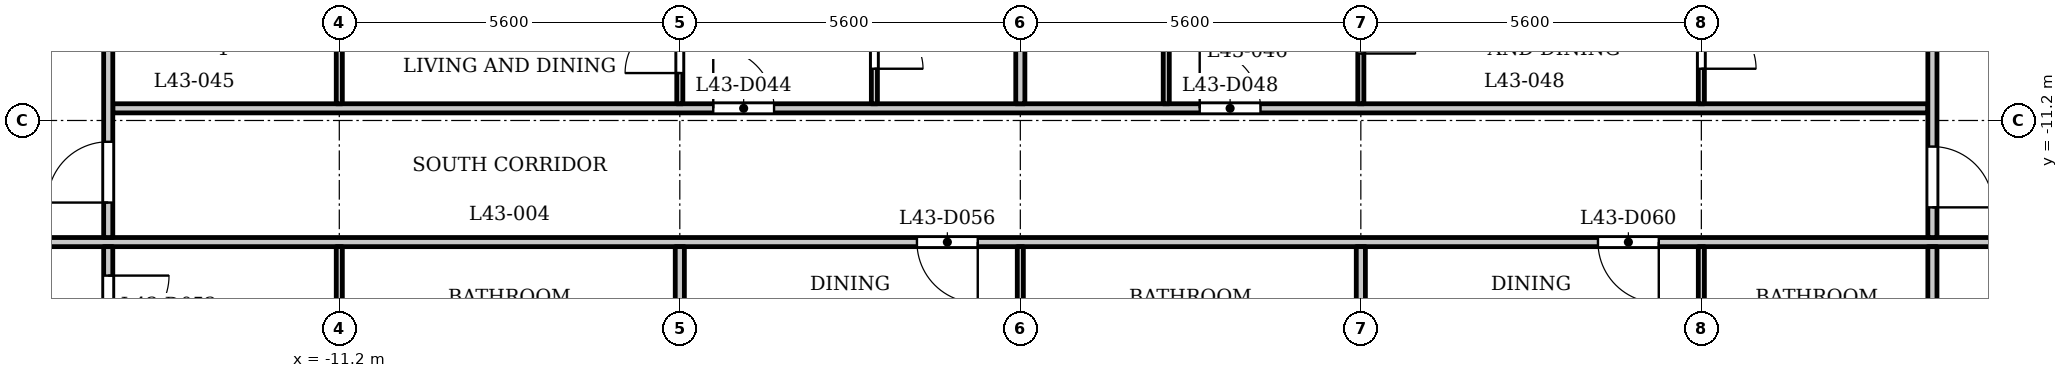
"""IFC4 building model, lengths in metres.
Left out: names, types, materials, properties, quantities, classifications, styles, units other than length and angle.
Written with IfcOpenShell. Run it as: python <this file> out.ifc"""

import sys

from ifc_helpers import new_model, si_unit, direction, frame, frame_2d, origin, place, context, subcontext, project, spatial, rectangle, extrude, element, fill, save


model = new_model("IFC4")
c1 = context("Model", 3, precision=1e-05, world=origin(), true_north=direction((0.0, 1.0)))
c2 = subcontext(c1, "Body", "Model", "MODEL_VIEW")
j1 = project(units=[si_unit("LENGTHUNIT", "METRE"), si_unit("PLANEANGLEUNIT", "RADIAN")], contexts=[c1])
p1 = place(None, origin())
s1 = spatial("IfcSite", under=j1, at=p1, CompositionType="ELEMENT")
p2 = place(p1, origin())
s2 = spatial("IfcBuilding", under=s1, at=p2, CompositionType="ELEMENT")
p3 = place(p2, frame((0.0, 0.0, 167.6)))
s3 = spatial("IfcBuildingStorey", under=s2, at=p3, CompositionType="ELEMENT", Elevation=167.6)
p4 = place(p3, frame((-17.4, -13.2, 0.0), z_axis=(0.0, 0.0, 1.0), x_axis=(1.0, 0.0, 0.0)))
e1 = element("IfcWall", 1, at=p4, inside=s3, PredefinedType="PARTITIONING", context=c2, shape_type="SweptSolid", body=[
    extrude(rectangle(XDim=34.8, YDim=0.15, at=frame_2d((17.4, 0.0))), origin(), (0.0, 0.0, 1.0), 3.2),
])
p5 = place(p4, frame((0.15, 0.0, 0.0)))
e2 = element("IfcOpeningElement", 2, at=p5, cuts=e1, PredefinedType="OPENING", context=c2, shape_type="SweptSolid", body=[
    extrude(rectangle(XDim=1.0, YDim=2.1, at=frame_2d((0.5, 1.05))), frame((0.0, 0.085, 0.0), z_axis=(0.0, -1.0, 0.0), x_axis=(1.0, 0.0, 0.0)), (0.0, 0.0, 1.0), 0.17),
])
p6 = place(p4, frame((33.55, 0.0, 0.0)))
e3 = element("IfcOpeningElement", 3, at=p6, cuts=e1, PredefinedType="OPENING", context=c2, shape_type="SweptSolid", body=[
    extrude(rectangle(XDim=1.0, YDim=2.1, at=frame_2d((0.5, 1.05))), frame((0.0, 0.085, 0.0), z_axis=(0.0, -1.0, 0.0), x_axis=(1.0, 0.0, 0.0)), (0.0, 0.0, 1.0), 0.17),
])
p7 = place(p4, frame((15.7, 0.0, 0.0)))
e4 = element("IfcOpeningElement", 4, at=p7, cuts=e1, PredefinedType="OPENING", context=c2, shape_type="SweptSolid", body=[
    extrude(rectangle(XDim=1.0, YDim=2.1, at=frame_2d((0.5, 1.05))), frame((0.0, 0.085, 0.0), z_axis=(0.0, -1.0, 0.0), x_axis=(1.0, 0.0, 0.0)), (0.0, 0.0, 1.0), 0.17),
])
p8 = place(p4, frame((26.9, 0.0, 0.0)))
e5 = element("IfcOpeningElement", 5, at=p8, cuts=e1, PredefinedType="OPENING", context=c2, shape_type="SweptSolid", body=[
    extrude(rectangle(XDim=1.0, YDim=2.1, at=frame_2d((0.5, 1.05))), frame((0.0, 0.085, 0.0), z_axis=(0.0, -1.0, 0.0), x_axis=(1.0, 0.0, 0.0)), (0.0, 0.0, 1.0), 0.17),
])
p9 = place(p3, frame((-14.925, -11.0, 0.0), z_axis=(0.0, 0.0, 1.0), x_axis=(1.0, 0.0, 0.0)))
e6 = element("IfcWall", 6, at=p9, inside=s3, PredefinedType="PARTITIONING", context=c2, shape_type="SweptSolid", body=[
    extrude(rectangle(XDim=29.85, YDim=0.15, at=frame_2d((14.925, 0.0))), origin(), (0.0, 0.0, 1.0), 3.2),
])
p10 = place(p9, frame((9.875, 0.0, 0.0)))
e7 = element("IfcOpeningElement", 7, at=p10, cuts=e6, PredefinedType="OPENING", context=c2, shape_type="SweptSolid", body=[
    extrude(rectangle(XDim=1.0, YDim=2.1, at=frame_2d((0.5, 1.05))), frame((0.0, 0.085, 0.0), z_axis=(0.0, -1.0, 0.0), x_axis=(1.0, 0.0, 0.0)), (0.0, 0.0, 1.0), 0.17),
])
p11 = place(p9, frame((17.875, 0.0, 0.0)))
e8 = element("IfcOpeningElement", 8, at=p11, cuts=e6, PredefinedType="OPENING", context=c2, shape_type="SweptSolid", body=[
    extrude(rectangle(XDim=1.0, YDim=2.1, at=frame_2d((0.5, 1.05))), frame((0.0, 0.085, 0.0), z_axis=(0.0, -1.0, 0.0), x_axis=(1.0, 0.0, 0.0)), (0.0, 0.0, 1.0), 0.17),
])
p12 = place(p3, frame((-15.0, -15.325, 0.0), z_axis=(0.0, 0.0, 1.0), x_axis=(0.0, 1.0, 0.0)))
e9 = element("IfcWall", 9, at=p12, inside=s3, PredefinedType="PARTITIONING", context=c2, shape_type="SweptSolid", body=[
    extrude(rectangle(XDim=2.05, YDim=0.15, at=frame_2d((1.025, 0.0))), origin(), (0.0, 0.0, 1.0), 3.2),
])
p13 = place(p12, frame((0.574, 0.0, 0.0)))
e10 = element("IfcOpeningElement", 10, at=p13, cuts=e9, PredefinedType="OPENING", context=c2, shape_type="SweptSolid", body=[
    extrude(rectangle(XDim=1.0, YDim=2.1, at=frame_2d((0.5, 1.05))), frame((0.0, 0.085, 0.0), z_axis=(0.0, -1.0, 0.0), x_axis=(1.0, 0.0, 0.0)), (0.0, 0.0, 1.0), 0.17),
])
p14 = place(p3, frame((-15.0, -13.125, 0.0), z_axis=(0.0, 0.0, 1.0), x_axis=(0.0, 1.0, 0.0)))
e11 = element("IfcWall", 11, at=p14, inside=s3, PredefinedType="PARTITIONING", context=c2, shape_type="SweptSolid", body=[
    extrude(rectangle(XDim=6.356, YDim=0.15, at=frame_2d((3.178, 0.0))), origin(), (0.0, 0.0, 1.0), 3.2),
])
p15 = place(p14, frame((0.575, 0.0, 0.0)))
e12 = element("IfcOpeningElement", 12, at=p15, cuts=e11, PredefinedType="OPENING", context=c2, shape_type="SweptSolid", body=[
    extrude(rectangle(XDim=1.0, YDim=2.1, at=frame_2d((0.5, 1.05))), frame((0.0, 0.085, 0.0), z_axis=(0.0, -1.0, 0.0), x_axis=(1.0, 0.0, 0.0)), (0.0, 0.0, 1.0), 0.17),
])
p16 = place(p3, frame((-11.2, -15.85, 0.0), z_axis=(0.0, 0.0, 1.0), x_axis=(0.0, 1.0, 0.0)))
e13 = element("IfcWall", 13, at=p16, inside=s3, PredefinedType="PARTITIONING", context=c2, shape_type="SweptSolid", body=[
    extrude(rectangle(XDim=2.575, YDim=0.1, at=frame_2d((1.288, 0.0))), origin(), (0.0, 0.0, 1.0), 3.2),
])
p17 = place(p3, frame((-11.2, -10.925, 0.0), z_axis=(0.0, 0.0, 1.0), x_axis=(0.0, 1.0, 0.0)))
e14 = element("IfcWall", 14, at=p17, inside=s3, PredefinedType="PARTITIONING", context=c2, shape_type="SweptSolid", body=[
    extrude(rectangle(XDim=3.605, YDim=0.1, at=frame_2d((1.802, 0.0))), origin(), (0.0, 0.0, 1.0), 3.2),
])
p18 = place(p17, frame((1.005, 0.0, 0.0)))
e15 = element("IfcOpeningElement", 15, at=p18, cuts=e14, PredefinedType="OPENING", context=c2, shape_type="SweptSolid", body=[
    extrude(rectangle(XDim=0.9, YDim=2.1, at=frame_2d((0.45, 1.05))), frame((0.0, 0.06, 0.0), z_axis=(0.0, -1.0, 0.0), x_axis=(1.0, 0.0, 0.0)), (0.0, 0.0, 1.0), 0.12),
])
p19 = place(p3, frame((-5.6, -10.925, 0.0), z_axis=(0.0, 0.0, 1.0), x_axis=(0.0, 1.0, 0.0)))
e16 = element("IfcWall", 16, at=p19, inside=s3, PredefinedType="PARTITIONING", context=c2, shape_type="SweptSolid", body=[
    extrude(rectangle(XDim=3.605, YDim=0.1, at=frame_2d((1.802, 0.0))), origin(), (0.0, 0.0, 1.0), 3.2),
])
p20 = place(p19, frame((0.505, 0.0, 0.0)))
e17 = element("IfcOpeningElement", 17, at=p20, cuts=e16, PredefinedType="OPENING", context=c2, shape_type="SweptSolid", body=[
    extrude(rectangle(XDim=0.9, YDim=2.1, at=frame_2d((0.45, 1.05))), frame((0.0, 0.06, 0.0), z_axis=(0.0, -1.0, 0.0), x_axis=(1.0, 0.0, 0.0)), (0.0, 0.0, 1.0), 0.12),
])
p21 = place(p3, frame((-5.6, -15.85, 0.0), z_axis=(0.0, 0.0, 1.0), x_axis=(0.0, 1.0, 0.0)))
e18 = element("IfcWall", 18, at=p21, inside=s3, PredefinedType="PARTITIONING", context=c2, shape_type="SweptSolid", body=[
    extrude(rectangle(XDim=2.575, YDim=0.15, at=frame_2d((1.288, 0.0))), origin(), (0.0, 0.0, 1.0), 3.2),
])
p22 = place(p3, frame((-2.4, -10.925, 0.0), z_axis=(0.0, 0.0, 1.0), x_axis=(0.0, 1.0, 0.0)))
e19 = element("IfcWall", 19, at=p22, inside=s3, PredefinedType="PARTITIONING", context=c2, shape_type="SweptSolid", body=[
    extrude(rectangle(XDim=3.605, YDim=0.1, at=frame_2d((1.802, 0.0))), origin(), (0.0, 0.0, 1.0), 3.2),
])
p23 = place(p22, frame((0.576, 0.0, 0.0)))
e20 = element("IfcOpeningElement", 20, at=p23, cuts=e19, PredefinedType="OPENING", context=c2, shape_type="SweptSolid", body=[
    extrude(rectangle(XDim=0.8, YDim=2.1, at=frame_2d((0.4, 1.05))), frame((0.0, 0.06, 0.0), z_axis=(0.0, -1.0, 0.0), x_axis=(1.0, 0.0, 0.0)), (0.0, 0.0, 1.0), 0.12),
])
p24 = place(p3, frame((0.0, -15.85, 0.0), z_axis=(0.0, 0.0, 1.0), x_axis=(0.0, 1.0, 0.0)))
e21 = element("IfcWall", 21, at=p24, inside=s3, PredefinedType="PARTITIONING", context=c2, shape_type="SweptSolid", body=[
    extrude(rectangle(XDim=2.575, YDim=0.1, at=frame_2d((1.288, 0.0))), origin(), (0.0, 0.0, 1.0), 3.2),
])
p25 = place(p3, frame((0.0, -10.925, 0.0), z_axis=(0.0, 0.0, 1.0), x_axis=(0.0, 1.0, 0.0)))
e22 = element("IfcWall", 22, at=p25, inside=s3, PredefinedType="PARTITIONING", context=c2, shape_type="SweptSolid", body=[
    extrude(rectangle(XDim=3.605, YDim=0.15, at=frame_2d((1.802, 0.0))), origin(), (0.0, 0.0, 1.0), 3.2),
])
p26 = place(p3, frame((2.4, -10.925, 0.0), z_axis=(0.0, 0.0, 1.0), x_axis=(0.0, 1.0, 0.0)))
e23 = element("IfcWall", 23, at=p26, inside=s3, PredefinedType="PARTITIONING", context=c2, shape_type="SweptSolid", body=[
    extrude(rectangle(XDim=3.605, YDim=0.1, at=frame_2d((1.802, 0.0))), origin(), (0.0, 0.0, 1.0), 3.2),
])
p27 = place(p26, frame((2.355, 0.0, 0.0)))
e24 = element("IfcOpeningElement", 24, at=p27, cuts=e23, PredefinedType="OPENING", context=c2, shape_type="SweptSolid", body=[
    extrude(rectangle(XDim=0.8, YDim=2.1, at=frame_2d((0.4, 1.05))), frame((0.0, 0.06, 0.0), z_axis=(0.0, -1.0, 0.0), x_axis=(1.0, 0.0, 0.0)), (0.0, 0.0, 1.0), 0.12),
])
p28 = place(p3, frame((5.6, -10.925, 0.0), z_axis=(0.0, 0.0, 1.0), x_axis=(0.0, 1.0, 0.0)))
e25 = element("IfcWall", 25, at=p28, inside=s3, PredefinedType="PARTITIONING", context=c2, shape_type="SweptSolid", body=[
    extrude(rectangle(XDim=3.605, YDim=0.1, at=frame_2d((1.802, 0.0))), origin(), (0.0, 0.0, 1.0), 3.2),
])
p29 = place(p28, frame((0.826, 0.0, 0.0)))
e26 = element("IfcOpeningElement", 26, at=p29, cuts=e25, PredefinedType="OPENING", context=c2, shape_type="SweptSolid", body=[
    extrude(rectangle(XDim=0.9, YDim=2.1, at=frame_2d((0.45, 1.05))), frame((0.0, 0.06, 0.0), z_axis=(0.0, -1.0, 0.0), x_axis=(1.0, 0.0, 0.0)), (0.0, 0.0, 1.0), 0.12),
])
p30 = place(p3, frame((5.6, -15.85, 0.0), z_axis=(0.0, 0.0, 1.0), x_axis=(0.0, 1.0, 0.0)))
e27 = element("IfcWall", 27, at=p30, inside=s3, PredefinedType="PARTITIONING", context=c2, shape_type="SweptSolid", body=[
    extrude(rectangle(XDim=2.575, YDim=0.15, at=frame_2d((1.288, 0.0))), origin(), (0.0, 0.0, 1.0), 3.2),
])
p31 = place(p3, frame((11.2, -15.85, 0.0), z_axis=(0.0, 0.0, 1.0), x_axis=(0.0, 1.0, 0.0)))
e28 = element("IfcWall", 28, at=p31, inside=s3, PredefinedType="PARTITIONING", context=c2, shape_type="SweptSolid", body=[
    extrude(rectangle(XDim=2.575, YDim=0.1, at=frame_2d((1.288, 0.0))), origin(), (0.0, 0.0, 1.0), 3.2),
])
p32 = place(p3, frame((11.2, -10.925, 0.0), z_axis=(0.0, 0.0, 1.0), x_axis=(0.0, 1.0, 0.0)))
e29 = element("IfcWall", 29, at=p32, inside=s3, PredefinedType="PARTITIONING", context=c2, shape_type="SweptSolid", body=[
    extrude(rectangle(XDim=3.605, YDim=0.1, at=frame_2d((1.802, 0.0))), origin(), (0.0, 0.0, 1.0), 3.2),
])
p33 = place(p32, frame((0.576, 0.0, 0.0)))
e30 = element("IfcOpeningElement", 30, at=p33, cuts=e29, PredefinedType="OPENING", context=c2, shape_type="SweptSolid", body=[
    extrude(rectangle(XDim=0.9, YDim=2.1, at=frame_2d((0.45, 1.05))), frame((0.0, 0.06, 0.0), z_axis=(0.0, -1.0, 0.0), x_axis=(1.0, 0.0, 0.0)), (0.0, 0.0, 1.0), 0.12),
])
p34 = place(p3, frame((15.0, -15.325, 0.0), z_axis=(0.0, 0.0, 1.0), x_axis=(0.0, 1.0, 0.0)))
e31 = element("IfcWall", 31, at=p34, inside=s3, PredefinedType="PARTITIONING", context=c2, shape_type="SweptSolid", body=[
    extrude(rectangle(XDim=2.05, YDim=0.15, at=frame_2d((1.025, 0.0))), origin(), (0.0, 0.0, 1.0), 3.2),
])
p35 = place(p3, frame((15.0, -13.125, 0.0), z_axis=(0.0, 0.0, 1.0), x_axis=(0.0, 1.0, 0.0)))
e32 = element("IfcWall", 32, at=p35, inside=s3, PredefinedType="PARTITIONING", context=c2, shape_type="SweptSolid", body=[
    extrude(rectangle(XDim=6.356, YDim=0.15, at=frame_2d((3.178, 0.0))), origin(), (0.0, 0.0, 1.0), 3.2),
])
p36 = place(p35, frame((0.496, 0.0, 0.0)))
e33 = element("IfcOpeningElement", 33, at=p36, cuts=e32, PredefinedType="OPENING", context=c2, shape_type="SweptSolid", body=[
    extrude(rectangle(XDim=1.0, YDim=2.1, at=frame_2d((0.5, 1.05))), frame((0.0, 0.085, 0.0), z_axis=(0.0, -1.0, 0.0), x_axis=(1.0, 0.0, 0.0)), (0.0, 0.0, 1.0), 0.17),
])
p37 = place(p15, origin())
e34 = element("IfcDoor", 34, at=p37, inside=s3, OperationType="SINGLE_SWING_RIGHT", PredefinedType="DOOR", context=c2, shape_type="SweptSolid", body=[
    extrude(rectangle(XDim=1.0, YDim=2.1, at=frame_2d((0.5, 1.05))), frame((0.0, 0.025, 0.0), z_axis=(0.0, -1.0, 0.0), x_axis=(1.0, 0.0, 0.0)), (0.0, 0.0, 1.0), 0.05),
])
fill(e12, e34)
p38 = place(p36, origin())
e35 = element("IfcDoor", 35, at=p38, inside=s3, OperationType="SINGLE_SWING_LEFT", PredefinedType="DOOR", context=c2, shape_type="SweptSolid", body=[
    extrude(rectangle(XDim=1.0, YDim=2.1, at=frame_2d((0.5, 1.05))), frame((0.0, 0.025, 0.0), z_axis=(0.0, -1.0, 0.0), x_axis=(1.0, 0.0, 0.0)), (0.0, 0.0, 1.0), 0.05),
])
fill(e33, e35)
p39 = place(p10, origin())
e36 = element("IfcDoor", 36, at=p39, inside=s3, OperationType="SINGLE_SWING_RIGHT", PredefinedType="DOOR", context=c2, shape_type="SweptSolid", body=[
    extrude(rectangle(XDim=1.0, YDim=2.1, at=frame_2d((0.5, 1.05))), frame((0.0, 0.025, 0.0), z_axis=(0.0, -1.0, 0.0), x_axis=(1.0, 0.0, 0.0)), (0.0, 0.0, 1.0), 0.05),
])
fill(e7, e36)
p40 = place(p23, origin())
e37 = element("IfcDoor", 37, at=p40, inside=s3, OperationType="SINGLE_SWING_LEFT", PredefinedType="DOOR", context=c2, shape_type="SweptSolid", body=[
    extrude(rectangle(XDim=0.8, YDim=2.1, at=frame_2d((0.4, 1.05))), frame((0.0, 0.025, 0.0), z_axis=(0.0, -1.0, 0.0), x_axis=(1.0, 0.0, 0.0)), (0.0, 0.0, 1.0), 0.05),
])
fill(e20, e37)
p41 = place(p20, origin())
e38 = element("IfcDoor", 38, at=p41, inside=s3, OperationType="SINGLE_SWING_RIGHT", PredefinedType="DOOR", context=c2, shape_type="SweptSolid", body=[
    extrude(rectangle(XDim=0.9, YDim=2.1, at=frame_2d((0.45, 1.05))), frame((0.0, 0.025, 0.0), z_axis=(0.0, -1.0, 0.0), x_axis=(1.0, 0.0, 0.0)), (0.0, 0.0, 1.0), 0.05),
])
fill(e17, e38)
p42 = place(p11, origin())
e39 = element("IfcDoor", 39, at=p42, inside=s3, OperationType="SINGLE_SWING_RIGHT", PredefinedType="DOOR", context=c2, shape_type="SweptSolid", body=[
    extrude(rectangle(XDim=1.0, YDim=2.1, at=frame_2d((0.5, 1.05))), frame((0.0, 0.025, 0.0), z_axis=(0.0, -1.0, 0.0), x_axis=(1.0, 0.0, 0.0)), (0.0, 0.0, 1.0), 0.05),
])
fill(e8, e39)
p43 = place(p29, origin())
e40 = element("IfcDoor", 40, at=p43, inside=s3, OperationType="SINGLE_SWING_LEFT", PredefinedType="DOOR", context=c2, shape_type="SweptSolid", body=[
    extrude(rectangle(XDim=0.9, YDim=2.1, at=frame_2d((0.45, 1.05))), frame((0.0, 0.025, 0.0), z_axis=(0.0, -1.0, 0.0), x_axis=(1.0, 0.0, 0.0)), (0.0, 0.0, 1.0), 0.05),
])
fill(e26, e40)
p44 = place(p33, origin())
e41 = element("IfcDoor", 41, at=p44, inside=s3, OperationType="SINGLE_SWING_LEFT", PredefinedType="DOOR", context=c2, shape_type="SweptSolid", body=[
    extrude(rectangle(XDim=0.9, YDim=2.1, at=frame_2d((0.45, 1.05))), frame((0.0, 0.025, 0.0), z_axis=(0.0, -1.0, 0.0), x_axis=(1.0, 0.0, 0.0)), (0.0, 0.0, 1.0), 0.05),
])
fill(e30, e41)
p45 = place(p13, origin())
e42 = element("IfcDoor", 42, at=p45, inside=s3, OperationType="SINGLE_SWING_RIGHT", PredefinedType="DOOR", context=c2, shape_type="SweptSolid", body=[
    extrude(rectangle(XDim=1.0, YDim=2.1, at=frame_2d((0.5, 1.05))), frame((0.0, 0.025, 0.0), z_axis=(0.0, -1.0, 0.0), x_axis=(1.0, 0.0, 0.0)), (0.0, 0.0, 1.0), 0.05),
])
fill(e10, e42)
p46 = place(p7, origin())
e43 = element("IfcDoor", 43, at=p46, inside=s3, OperationType="SINGLE_SWING_RIGHT", PredefinedType="DOOR", context=c2, shape_type="SweptSolid", body=[
    extrude(rectangle(XDim=1.0, YDim=2.1, at=frame_2d((0.5, 1.05))), frame((0.0, 0.025, 0.0), z_axis=(0.0, -1.0, 0.0), x_axis=(1.0, 0.0, 0.0)), (0.0, 0.0, 1.0), 0.05),
])
fill(e4, e43)
p47 = place(p8, origin())
e44 = element("IfcDoor", 44, at=p47, inside=s3, OperationType="SINGLE_SWING_RIGHT", PredefinedType="DOOR", context=c2, shape_type="SweptSolid", body=[
    extrude(rectangle(XDim=1.0, YDim=2.1, at=frame_2d((0.5, 1.05))), frame((0.0, 0.025, 0.0), z_axis=(0.0, -1.0, 0.0), x_axis=(1.0, 0.0, 0.0)), (0.0, 0.0, 1.0), 0.05),
])
fill(e5, e44)
save(model, sys.argv[1])
